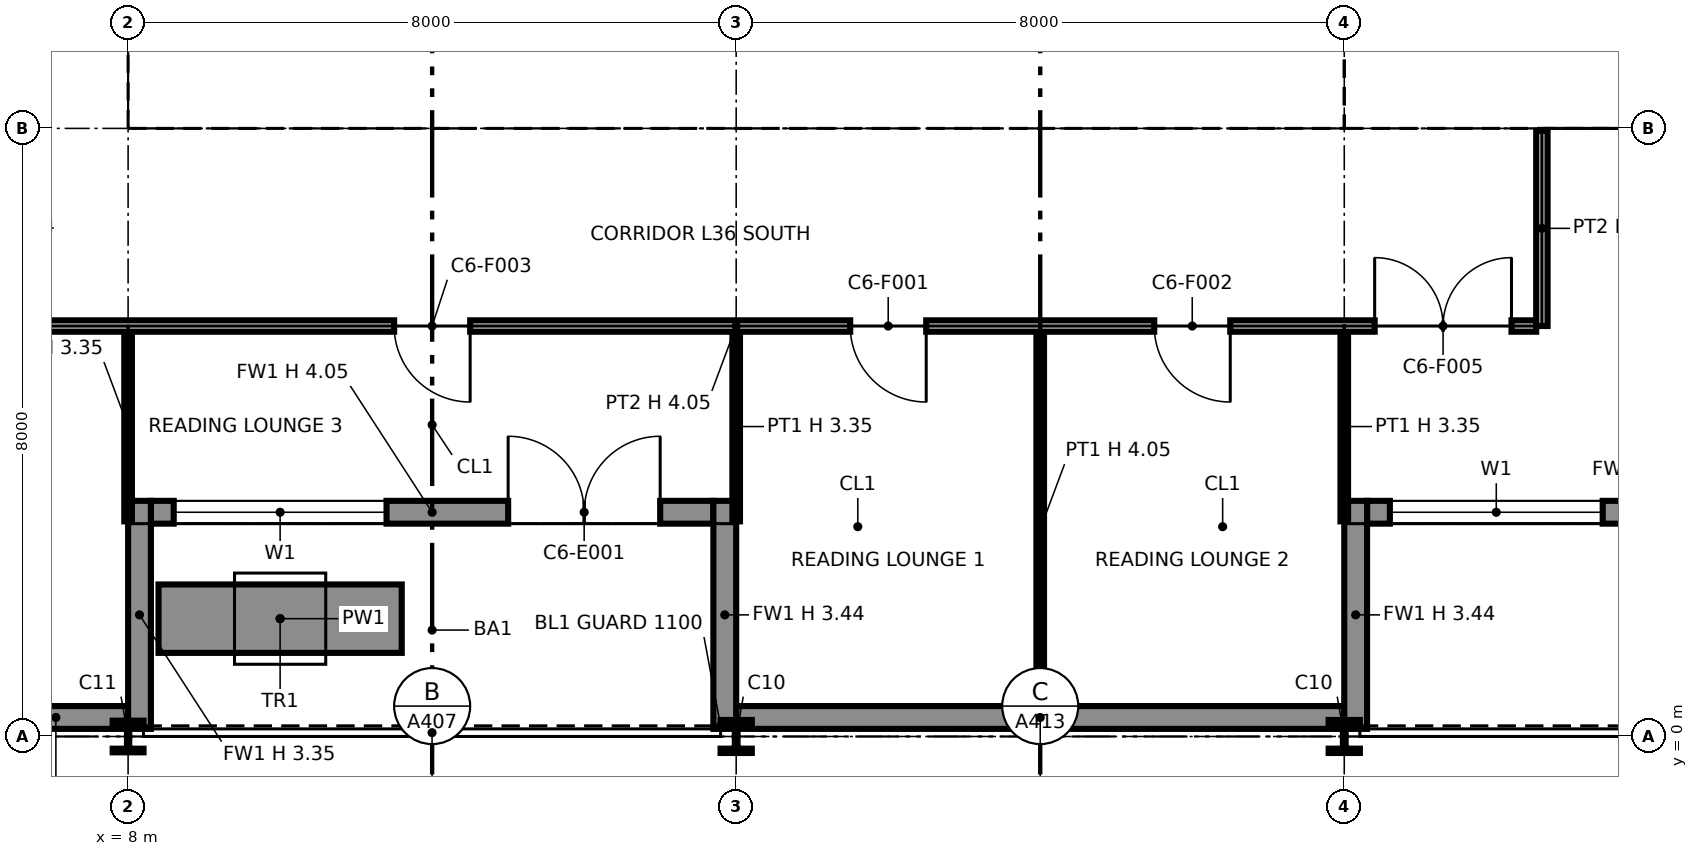
"""IFC4 building model, lengths in metres.
Left out: names, types, materials, properties, quantities, classifications, styles, units other than length and angle.
Written with IfcOpenShell. Run it as: python <this file> out.ifc"""

import sys

from ifc_helpers import new_model, si_unit, direction, frame, frame_2d, origin, origin_2d, place, context, subcontext, project, spatial, polyline, rectangle, i_section, outline, extrude, element, fill, save


model = new_model("IFC4")
c1 = context("Model", 3, precision=1e-05, world=origin(), true_north=direction((0.0, 1.0)))
c2 = subcontext(c1, "Body", "Model", "MODEL_VIEW")
j1 = project(units=[si_unit("LENGTHUNIT", "METRE"), si_unit("PLANEANGLEUNIT", "RADIAN")], contexts=[c1])
p1 = place(None, origin())
s1 = spatial("IfcSite", under=j1, at=p1, CompositionType="ELEMENT")
p2 = place(p1, origin())
s2 = spatial("IfcBuilding", under=s1, at=p2, CompositionType="ELEMENT")
p3 = place(p2, frame((0.0, 0.0, 174.6)))
s3 = spatial("IfcBuildingStorey", under=s2, at=p3, CompositionType="ELEMENT", Elevation=174.6)
p4 = place(p3, frame((8.0, 0.0, 0.0), z_axis=(0.0, 0.0, 1.0), x_axis=(1.0, 0.0, 0.0)))
e1 = element("IfcColumn", 1, at=p4, inside=s3, PredefinedType="COLUMN", context=c2, shape_type="SweptSolid", body=[
    extrude(i_section(OverallWidth=0.406, OverallDepth=0.417, WebThickness=0.03, FlangeThickness=0.048, at=origin_2d()), origin(), (0.0, 0.0, 1.0), 4.05),
])
p5 = place(p3, frame((8.0, 8.0, 0.0), z_axis=(0.0, 0.0, 1.0), x_axis=(1.0, 0.0, 0.0)))
e2 = element("IfcColumn", 2, at=p5, inside=s3, PredefinedType="COLUMN", context=c2, shape_type="SweptSolid", body=[
    extrude(i_section(OverallWidth=0.399, OverallDepth=0.386, WebThickness=0.021, FlangeThickness=0.033, at=origin_2d()), origin(), (0.0, 0.0, 1.0), 4.05),
])
p6 = place(p3, frame((16.0, 0.0, 0.0), z_axis=(0.0, 0.0, 1.0), x_axis=(1.0, 0.0, 0.0)))
e3 = element("IfcColumn", 3, at=p6, inside=s3, PredefinedType="COLUMN", context=c2, shape_type="SweptSolid", body=[
    extrude(i_section(OverallWidth=0.411, OverallDepth=0.434, WebThickness=0.036, FlangeThickness=0.057, at=origin_2d()), origin(), (0.0, 0.0, 1.0), 4.05),
])
p7 = place(p3, frame((16.0, 8.0, 0.0), z_axis=(0.0, 0.0, 1.0), x_axis=(1.0, 0.0, 0.0)))
e4 = element("IfcColumn", 4, at=p7, inside=s3, PredefinedType="COLUMN", context=c2, shape_type="SweptSolid", body=[
    extrude(i_section(OverallWidth=0.399, OverallDepth=0.386, WebThickness=0.021, FlangeThickness=0.033, at=origin_2d()), origin(), (0.0, 0.0, 1.0), 4.05),
])
p8 = place(p3, frame((24.0, 0.0, 0.0), z_axis=(0.0, 0.0, 1.0), x_axis=(1.0, 0.0, 0.0)))
e5 = element("IfcColumn", 5, at=p8, inside=s3, PredefinedType="COLUMN", context=c2, shape_type="SweptSolid", body=[
    extrude(i_section(OverallWidth=0.411, OverallDepth=0.434, WebThickness=0.036, FlangeThickness=0.057, at=origin_2d()), origin(), (0.0, 0.0, 1.0), 4.05),
])
p9 = place(p3, frame((24.0, 8.0, 0.0), z_axis=(0.0, 0.0, 1.0), x_axis=(1.0, 0.0, 0.0)))
e6 = element("IfcColumn", 6, at=p9, inside=s3, PredefinedType="COLUMN", context=c2, shape_type="SweptSolid", body=[
    extrude(i_section(OverallWidth=0.401, OverallDepth=0.399, WebThickness=0.025, FlangeThickness=0.04, at=origin_2d()), origin(), (0.0, 0.0, 1.0), 4.05),
])
p10 = place(p3, frame((6.1, 0.25, 0.0), z_axis=(0.0, 0.0, 1.0), x_axis=(1.0, 0.0, 0.0)))
e7 = element("IfcWall", 7, at=p10, inside=s3, PredefinedType="SOLIDWALL", context=c2, shape_type="SweptSolid", body=[
    extrude(rectangle(XDim=1.9, YDim=0.3, at=frame_2d((0.95, 0.0))), origin(), (0.0, 0.0, 1.0), 4.05),
])
p11 = place(p3, frame((8.3, 2.95, 0.0), z_axis=(0.0, 0.0, 1.0), x_axis=(1.0, 0.0, 0.0)))
e8 = element("IfcWall", 8, at=p11, inside=s3, PredefinedType="SOLIDWALL", context=c2, shape_type="SweptSolid", body=[
    extrude(rectangle(XDim=7.4, YDim=0.3, at=frame_2d((3.7, 0.0))), origin(), (0.0, 0.0, 1.0), 4.05),
])
p12 = place(p11, frame((0.3, 0.0, 0.9)))
e9 = element("IfcOpeningElement", 9, at=p12, cuts=e8, PredefinedType="OPENING", context=c2, shape_type="SweptSolid", body=[
    extrude(rectangle(XDim=2.8, YDim=2.2, at=frame_2d((1.4, 1.1))), frame((0.0, 0.16, 0.0), z_axis=(0.0, -1.0, 0.0), x_axis=(1.0, 0.0, 0.0)), (0.0, 0.0, 1.0), 0.32),
])
p13 = place(p11, frame((4.7, 0.0, 0.0)))
e10 = element("IfcOpeningElement", 10, at=p13, cuts=e8, PredefinedType="OPENING", context=c2, shape_type="SweptSolid", body=[
    extrude(rectangle(XDim=2.0, YDim=2.4, at=frame_2d((1.0, 1.2))), frame((0.0, 0.16, 0.0), z_axis=(0.0, -1.0, 0.0), x_axis=(1.0, 0.0, 0.0)), (0.0, 0.0, 1.0), 0.32),
])
p14 = place(p3, frame((8.15, 0.1, 0.0), z_axis=(0.0, 0.0, 1.0), x_axis=(0.0, 1.0, 0.0)))
e11 = element("IfcWall", 11, at=p14, inside=s3, PredefinedType="SOLIDWALL", context=c2, shape_type="SweptSolid", body=[
    extrude(rectangle(XDim=3.0, YDim=0.3, at=frame_2d((1.5, 0.0))), origin(), (0.0, 0.0, 1.0), 3.353),
])
p15 = place(p3, frame((15.85, 0.1, 0.0), z_axis=(0.0, 0.0, 1.0), x_axis=(0.0, 1.0, 0.0)))
e12 = element("IfcWall", 12, at=p15, inside=s3, PredefinedType="SOLIDWALL", context=c2, shape_type="SweptSolid", body=[
    extrude(rectangle(XDim=3.0, YDim=0.3, at=frame_2d((1.5, 0.0))), origin(), (0.0, 0.0, 1.0), 3.437),
])
p16 = place(p3, frame((16.0, 0.25, 0.0), z_axis=(0.0, 0.0, 1.0), x_axis=(1.0, 0.0, 0.0)))
e13 = element("IfcWall", 13, at=p16, inside=s3, PredefinedType="SOLIDWALL", context=c2, shape_type="SweptSolid", body=[
    extrude(rectangle(XDim=8.0, YDim=0.3, at=frame_2d((4.0, 0.0))), origin(), (0.0, 0.0, 1.0), 4.05),
])
p17 = place(p3, frame((24.3, 2.95, 0.0), z_axis=(0.0, 0.0, 1.0), x_axis=(1.0, 0.0, 0.0)))
e14 = element("IfcWall", 14, at=p17, inside=s3, PredefinedType="SOLIDWALL", context=c2, shape_type="SweptSolid", body=[
    extrude(rectangle(XDim=7.4, YDim=0.3, at=frame_2d((3.7, 0.0))), origin(), (0.0, 0.0, 1.0), 4.05),
])
p18 = place(p17, frame((0.3, 0.0, 0.9)))
e15 = element("IfcOpeningElement", 15, at=p18, cuts=e14, PredefinedType="OPENING", context=c2, shape_type="SweptSolid", body=[
    extrude(rectangle(XDim=2.8, YDim=2.2, at=frame_2d((1.4, 1.1))), frame((0.0, 0.16, 0.0), z_axis=(0.0, -1.0, 0.0), x_axis=(1.0, 0.0, 0.0)), (0.0, 0.0, 1.0), 0.32),
])
p19 = place(p17, frame((4.7, 0.0, 0.0)))
e16 = element("IfcOpeningElement", 16, at=p19, cuts=e14, PredefinedType="OPENING", context=c2, shape_type="SweptSolid", body=[
    extrude(rectangle(XDim=2.0, YDim=2.4, at=frame_2d((1.0, 1.2))), frame((0.0, 0.16, 0.0), z_axis=(0.0, -1.0, 0.0), x_axis=(1.0, 0.0, 0.0)), (0.0, 0.0, 1.0), 0.32),
])
p20 = place(p3, frame((24.15, 0.1, 0.0), z_axis=(0.0, 0.0, 1.0), x_axis=(0.0, 1.0, 0.0)))
e17 = element("IfcWall", 17, at=p20, inside=s3, PredefinedType="SOLIDWALL", context=c2, shape_type="SweptSolid", body=[
    extrude(rectangle(XDim=3.0, YDim=0.3, at=frame_2d((1.5, 0.0))), origin(), (0.0, 0.0, 1.0), 3.437),
])
p21 = place(p3, frame((8.4, 1.55, 0.0), z_axis=(0.0, 0.0, 1.0), x_axis=(1.0, 0.0, 0.0)))
e18 = element("IfcWall", 18, at=p21, inside=s3, PredefinedType="SOLIDWALL", context=c2, shape_type="SweptSolid", body=[
    extrude(rectangle(XDim=3.2, YDim=0.9, at=frame_2d((1.6, 0.0))), origin(), (0.0, 0.0, 1.0), 0.6),
])
p22 = place(p3, frame((8.65, 8.75, 0.0), z_axis=(0.0, 0.0, 1.0), x_axis=(1.0, 0.0, 0.0)))
e19 = element("IfcWall", 19, at=p22, inside=s3, PredefinedType="PARTITIONING", context=c2, shape_type="SweptSolid", body=[
    extrude(outline(polyline([(0.0, 0.0), (14.7, 0.0), (14.7, 4.05), (7.469, 4.05), (7.468, 3.442), (7.232, 3.442), (7.231, 4.05), (0.0, 4.05), (0.0, 0.0)])), frame((0.0, 0.1, 0.0), z_axis=(0.0, -1.0, 0.0), x_axis=(1.0, 0.0, 0.0)), (0.0, 0.0, 1.0), 0.2),
])
p23 = place(p22, frame((1.3, 0.0, 0.0)))
e20 = element("IfcOpeningElement", 20, at=p23, cuts=e19, PredefinedType="OPENING", context=c2, shape_type="SweptSolid", body=[
    extrude(rectangle(XDim=1.4, YDim=2.1, at=frame_2d((0.7, 1.05))), frame((0.0, 0.11, 0.0), z_axis=(0.0, -1.0, 0.0), x_axis=(1.0, 0.0, 0.0)), (0.0, 0.0, 1.0), 0.22),
])
p24 = place(p22, frame((4.6, 0.0, 0.0)))
e21 = element("IfcOpeningElement", 21, at=p24, cuts=e19, PredefinedType="OPENING", context=c2, shape_type="SweptSolid", body=[
    extrude(rectangle(XDim=1.4, YDim=2.1, at=frame_2d((0.7, 1.05))), frame((0.0, 0.11, 0.0), z_axis=(0.0, -1.0, 0.0), x_axis=(1.0, 0.0, 0.0)), (0.0, 0.0, 1.0), 0.22),
])
p25 = place(p22, frame((10.4, 0.0, 0.0)))
e22 = element("IfcOpeningElement", 22, at=p25, cuts=e19, PredefinedType="OPENING", context=c2, shape_type="SweptSolid", body=[
    extrude(rectangle(XDim=1.2, YDim=2.1, at=frame_2d((0.6, 1.05))), frame((0.0, 0.11, 0.0), z_axis=(0.0, -1.0, 0.0), x_axis=(1.0, 0.0, 0.0)), (0.0, 0.0, 1.0), 0.22),
])
p26 = place(p3, frame((8.75, 8.85, 0.0), z_axis=(0.0, 0.0, 1.0), x_axis=(0.0, 1.0, 0.0)))
e23 = element("IfcWall", 23, at=p26, inside=s3, PredefinedType="PARTITIONING", context=c2, shape_type="SweptSolid", body=[
    extrude(outline(polyline([(0.0, 0.0), (14.3, 0.0), (14.3, 4.05), (11.231, 4.05), (11.23, 3.589), (11.07, 3.589), (11.069, 4.05), (7.269, 4.05), (7.268, 3.442), (7.032, 3.442), (7.031, 4.05), (0.0, 4.05), (0.0, 0.0)])), frame((0.0, 0.1, 0.0), z_axis=(0.0, -1.0, 0.0), x_axis=(1.0, 0.0, 0.0)), (0.0, 0.0, 1.0), 0.2),
])
p27 = place(p26, frame((8.3, 0.0, 0.0)))
e24 = element("IfcOpeningElement", 24, at=p27, cuts=e23, PredefinedType="OPENING", context=c2, shape_type="SweptSolid", body=[
    extrude(rectangle(XDim=1.8, YDim=2.1, at=frame_2d((0.9, 1.05))), frame((0.0, 0.11, 0.0), z_axis=(0.0, -1.0, 0.0), x_axis=(1.0, 0.0, 0.0)), (0.0, 0.0, 1.0), 0.22),
])
p28 = place(p3, frame((12.4, 8.85, 0.0), z_axis=(0.0, 0.0, 1.0), x_axis=(0.0, 1.0, 0.0)))
e25 = element("IfcWall", 25, at=p28, inside=s3, PredefinedType="PARTITIONING", context=c2, shape_type="SweptSolid", body=[
    extrude(rectangle(XDim=6.85, YDim=0.2, at=frame_2d((3.425, 0.0))), origin(), (0.0, 0.0, 1.0), 4.05),
])
p29 = place(p3, frame((15.85, 8.85, 0.0), z_axis=(0.0, 0.0, 1.0), x_axis=(0.0, 1.0, 0.0)))
e26 = element("IfcWall", 26, at=p29, inside=s3, PredefinedType="PARTITIONING", context=c2, shape_type="SweptSolid", body=[
    extrude(rectangle(XDim=1.55, YDim=0.9, at=frame_2d((0.775, 0.0))), origin(), (0.0, 0.0, 1.0), 3.442),
])
p30 = place(p29, frame((0.3, 0.0, 0.0)))
e27 = element("IfcOpeningElement", 27, at=p30, cuts=e26, PredefinedType="OPENING", context=c2, shape_type="SweptSolid", body=[
    extrude(rectangle(XDim=1.1, YDim=2.1, at=frame_2d((0.55, 1.05))), frame((0.0, 0.46, 0.0), z_axis=(0.0, -1.0, 0.0), x_axis=(1.0, 0.0, 0.0)), (0.0, 0.0, 1.0), 0.92),
])
p31 = place(p3, frame((23.25, 8.85, 0.0), z_axis=(0.0, 0.0, 1.0), x_axis=(0.0, 1.0, 0.0)))
e28 = element("IfcWall", 28, at=p31, inside=s3, PredefinedType="PARTITIONING", context=c2, shape_type="SweptSolid", body=[
    extrude(outline(polyline([(0.0, 0.0), (14.3, 0.0), (14.3, 4.05), (11.231, 4.05), (11.23, 3.589), (11.07, 3.589), (11.069, 4.05), (7.269, 4.05), (7.268, 3.442), (7.032, 3.442), (7.031, 4.05), (1.231, 4.05), (1.23, 3.589), (1.07, 3.589), (1.069, 4.05), (0.0, 4.05), (0.0, 0.0)])), frame((0.0, 0.1, 0.0), z_axis=(0.0, -1.0, 0.0), x_axis=(1.0, 0.0, 0.0)), (0.0, 0.0, 1.0), 0.2),
])
p32 = place(p31, frame((8.3, 0.0, 0.0)))
e29 = element("IfcOpeningElement", 29, at=p32, cuts=e28, PredefinedType="OPENING", context=c2, shape_type="SweptSolid", body=[
    extrude(rectangle(XDim=1.8, YDim=2.1, at=frame_2d((0.9, 1.05))), frame((0.0, 0.11, 0.0), z_axis=(0.0, -1.0, 0.0), x_axis=(1.0, 0.0, 0.0)), (0.0, 0.0, 1.0), 0.22),
])
p33 = place(p3, frame((24.65, 8.75, 0.0), z_axis=(0.0, 0.0, 1.0), x_axis=(1.0, 0.0, 0.0)))
e30 = element("IfcWall", 30, at=p33, inside=s3, PredefinedType="PARTITIONING", context=c2, shape_type="SweptSolid", body=[
    extrude(outline(polyline([(0.0, 0.0), (14.7, 0.0), (14.7, 4.05), (7.469, 4.05), (7.468, 3.442), (7.232, 3.442), (7.231, 4.05), (0.0, 4.05), (0.0, 0.0)])), frame((0.0, 0.1, 0.0), z_axis=(0.0, -1.0, 0.0), x_axis=(1.0, 0.0, 0.0)), (0.0, 0.0, 1.0), 0.2),
])
p34 = place(p3, frame((24.75, 8.85, 0.0), z_axis=(0.0, 0.0, 1.0), x_axis=(0.0, 1.0, 0.0)))
e31 = element("IfcWall", 31, at=p34, inside=s3, PredefinedType="PARTITIONING", context=c2, shape_type="SweptSolid", body=[
    extrude(outline(polyline([(0.0, 0.0), (6.3, 0.0), (6.3, 4.05), (3.231, 4.05), (3.23, 3.589), (3.07, 3.589), (3.069, 4.05), (0.0, 4.05), (0.0, 0.0)])), frame((0.0, 0.1, 0.0), z_axis=(0.0, -1.0, 0.0), x_axis=(1.0, 0.0, 0.0)), (0.0, 0.0, 1.0), 0.2),
])
p35 = place(p3, frame((20.0, 0.13, 0.0), z_axis=(0.0, 0.0, 1.0), x_axis=(0.0, 1.0, 0.0)))
e32 = element("IfcWall", 32, at=p35, inside=s3, PredefinedType="PARTITIONING", context=c2, shape_type="SweptSolid", body=[
    extrude(outline(polyline([(0.0, 0.0), (5.195, 0.0), (5.195, 4.05), (4.17, 4.05), (4.168, 3.354), (3.572, 3.354), (3.57, 4.05), (0.0, 4.05), (0.0, 0.0)])), frame((0.0, 0.05, 0.0), z_axis=(0.0, -1.0, 0.0), x_axis=(1.0, 0.0, 0.0)), (0.0, 0.0, 1.0), 0.1),
])
for number, where, z_axis, x_axis in (
    (33, (8.0, 2.83, 0.0), (0.0, 0.0, 1.0), (0.0, 1.0, 0.0)),
    (34, (16.0, 2.83, 0.0), (0.0, 0.0, 1.0), (0.0, 1.0, 0.0)),
    (35, (24.0, 2.83, 0.0), (0.0, 0.0, 1.0), (0.0, 1.0, 0.0)),
):
    element("IfcWall", number, at=place(p3, frame(where, z_axis=z_axis, x_axis=x_axis)), inside=s3, PredefinedType="PARTITIONING", context=c2, shape_type="SweptSolid", body=[
        extrude(rectangle(XDim=2.495, YDim=0.1, at=frame_2d((1.248, 0.0))), origin(), (0.0, 0.0, 1.0), 3.354),
    ])
p36 = place(p3, frame((5.475, 5.4, 0.0), z_axis=(0.0, 0.0, 1.0), x_axis=(1.0, 0.0, 0.0)))
e36 = element("IfcWall", 36, at=p36, inside=s3, PredefinedType="PARTITIONING", context=c2, shape_type="SweptSolid", body=[
    extrude(rectangle(XDim=21.05, YDim=0.15, at=frame_2d((10.525, 0.0))), origin(), (0.0, 0.0, 1.0), 4.05),
])
p37 = place(p36, frame((13.025, 0.0, 0.0), z_axis=(0.0, 0.0, 1.0), x_axis=(-1.0, 0.0, 0.0)))
e37 = element("IfcOpeningElement", 37, at=p37, cuts=e36, PredefinedType="OPENING", context=c2, shape_type="SweptSolid", body=[
    extrude(rectangle(XDim=1.0, YDim=2.1, at=frame_2d((0.5, 1.05))), frame((0.0, 0.085, 0.0), z_axis=(0.0, -1.0, 0.0), x_axis=(1.0, 0.0, 0.0)), (0.0, 0.0, 1.0), 0.17),
])
p38 = place(p36, frame((17.025, 0.0, 0.0), z_axis=(0.0, 0.0, 1.0), x_axis=(-1.0, 0.0, 0.0)))
e38 = element("IfcOpeningElement", 38, at=p38, cuts=e36, PredefinedType="OPENING", context=c2, shape_type="SweptSolid", body=[
    extrude(rectangle(XDim=1.0, YDim=2.1, at=frame_2d((0.5, 1.05))), frame((0.0, 0.085, 0.0), z_axis=(0.0, -1.0, 0.0), x_axis=(1.0, 0.0, 0.0)), (0.0, 0.0, 1.0), 0.17),
])
p39 = place(p36, frame((7.025, 0.0, 0.0), z_axis=(0.0, 0.0, 1.0), x_axis=(-1.0, 0.0, 0.0)))
e39 = element("IfcOpeningElement", 39, at=p39, cuts=e36, PredefinedType="OPENING", context=c2, shape_type="SweptSolid", body=[
    extrude(rectangle(XDim=1.0, YDim=2.1, at=frame_2d((0.5, 1.05))), frame((0.0, 0.085, 0.0), z_axis=(0.0, -1.0, 0.0), x_axis=(1.0, 0.0, 0.0)), (0.0, 0.0, 1.0), 0.17),
])
p40 = place(p36, frame((18.925, 0.0, 0.0)))
e40 = element("IfcOpeningElement", 40, at=p40, cuts=e36, PredefinedType="OPENING", context=c2, shape_type="SweptSolid", body=[
    extrude(rectangle(XDim=1.8, YDim=2.1, at=frame_2d((0.9, 1.05))), frame((0.0, 0.085, 0.0), z_axis=(0.0, -1.0, 0.0), x_axis=(1.0, 0.0, 0.0)), (0.0, 0.0, 1.0), 0.17),
])
p41 = place(p3, frame((26.6, 5.4, 0.0), z_axis=(0.0, 0.0, 1.0), x_axis=(0.0, 1.0, 0.0)))
e41 = element("IfcWall", 41, at=p41, inside=s3, PredefinedType="PARTITIONING", context=c2, shape_type="SweptSolid", body=[
    extrude(rectangle(XDim=2.57, YDim=0.15, at=frame_2d((1.285, 0.0))), origin(), (0.0, 0.0, 1.0), 4.05),
])
p42 = place(p12, origin())
e42 = element("IfcWindow", 42, at=p42, inside=s3, PartitioningType="SINGLE_PANEL", PredefinedType="WINDOW", context=c2, shape_type="SweptSolid", body=[
    extrude(rectangle(XDim=2.8, YDim=2.2, at=frame_2d((1.4, 1.1))), frame((0.0, 0.03, 0.0), z_axis=(0.0, -1.0, 0.0), x_axis=(1.0, 0.0, 0.0)), (0.0, 0.0, 1.0), 0.06),
])
fill(e9, e42)
p43 = place(p13, origin())
e43 = element("IfcDoor", 43, at=p43, inside=s3, OperationType="DOUBLE_DOOR_SINGLE_SWING", PredefinedType="DOOR", context=c2, shape_type="SweptSolid", body=[
    extrude(rectangle(XDim=2.0, YDim=2.4, at=frame_2d((1.0, 1.2))), frame((0.0, 0.025, 0.0), z_axis=(0.0, -1.0, 0.0), x_axis=(1.0, 0.0, 0.0)), (0.0, 0.0, 1.0), 0.05),
])
fill(e10, e43)
p44 = place(p18, origin())
e44 = element("IfcWindow", 44, at=p44, inside=s3, PartitioningType="SINGLE_PANEL", PredefinedType="WINDOW", context=c2, shape_type="SweptSolid", body=[
    extrude(rectangle(XDim=2.8, YDim=2.2, at=frame_2d((1.4, 1.1))), frame((0.0, 0.03, 0.0), z_axis=(0.0, -1.0, 0.0), x_axis=(1.0, 0.0, 0.0)), (0.0, 0.0, 1.0), 0.06),
])
fill(e15, e44)
p45 = place(p23, origin())
e45 = element("IfcDoor", 45, at=p45, inside=s3, OperationType="DOUBLE_DOOR_SINGLE_SWING", PredefinedType="NOTDEFINED", context=c2, shape_type="SweptSolid", body=[
    extrude(rectangle(XDim=1.4, YDim=2.1, at=frame_2d((0.7, 1.05))), frame((0.0, 0.025, 0.0), z_axis=(0.0, -1.0, 0.0), x_axis=(1.0, 0.0, 0.0)), (0.0, 0.0, 1.0), 0.05),
])
fill(e20, e45)
p46 = place(p24, origin())
e46 = element("IfcDoor", 46, at=p46, inside=s3, OperationType="DOUBLE_DOOR_SINGLE_SWING", PredefinedType="NOTDEFINED", context=c2, shape_type="SweptSolid", body=[
    extrude(rectangle(XDim=1.4, YDim=2.1, at=frame_2d((0.7, 1.05))), frame((0.0, 0.025, 0.0), z_axis=(0.0, -1.0, 0.0), x_axis=(1.0, 0.0, 0.0)), (0.0, 0.0, 1.0), 0.05),
])
fill(e21, e46)
p47 = place(p25, origin())
e47 = element("IfcDoor", 47, at=p47, inside=s3, OperationType="SINGLE_SWING_RIGHT", PredefinedType="NOTDEFINED", context=c2, shape_type="SweptSolid", body=[
    extrude(rectangle(XDim=1.2, YDim=2.1, at=frame_2d((0.6, 1.05))), frame((0.0, 0.025, 0.0), z_axis=(0.0, -1.0, 0.0), x_axis=(1.0, 0.0, 0.0)), (0.0, 0.0, 1.0), 0.05),
])
fill(e22, e47)
p48 = place(p37, origin())
e48 = element("IfcDoor", 48, at=p48, inside=s3, OperationType="SINGLE_SWING_LEFT", PredefinedType="DOOR", context=c2, shape_type="SweptSolid", body=[
    extrude(rectangle(XDim=1.0, YDim=2.1, at=frame_2d((0.5, 1.05))), frame((0.0, 0.025, 0.0), z_axis=(0.0, -1.0, 0.0), x_axis=(1.0, 0.0, 0.0)), (0.0, 0.0, 1.0), 0.05),
])
fill(e37, e48)
p49 = place(p38, origin())
e49 = element("IfcDoor", 49, at=p49, inside=s3, OperationType="SINGLE_SWING_LEFT", PredefinedType="DOOR", context=c2, shape_type="SweptSolid", body=[
    extrude(rectangle(XDim=1.0, YDim=2.1, at=frame_2d((0.5, 1.05))), frame((0.0, 0.025, 0.0), z_axis=(0.0, -1.0, 0.0), x_axis=(1.0, 0.0, 0.0)), (0.0, 0.0, 1.0), 0.05),
])
fill(e38, e49)
p50 = place(p39, origin())
e50 = element("IfcDoor", 50, at=p50, inside=s3, OperationType="SINGLE_SWING_LEFT", PredefinedType="DOOR", context=c2, shape_type="SweptSolid", body=[
    extrude(rectangle(XDim=1.0, YDim=2.1, at=frame_2d((0.5, 1.05))), frame((0.0, 0.025, 0.0), z_axis=(0.0, -1.0, 0.0), x_axis=(1.0, 0.0, 0.0)), (0.0, 0.0, 1.0), 0.05),
])
fill(e39, e50)
p51 = place(p40, origin())
e51 = element("IfcDoor", 51, at=p51, inside=s3, OperationType="DOUBLE_DOOR_SINGLE_SWING", PredefinedType="DOOR", context=c2, shape_type="SweptSolid", body=[
    extrude(rectangle(XDim=1.8, YDim=2.1, at=frame_2d((0.9, 1.05))), frame((0.0, 0.025, 0.0), z_axis=(0.0, -1.0, 0.0), x_axis=(1.0, 0.0, 0.0)), (0.0, 0.0, 1.0), 0.05),
])
fill(e40, e51)
save(model, sys.argv[1])
